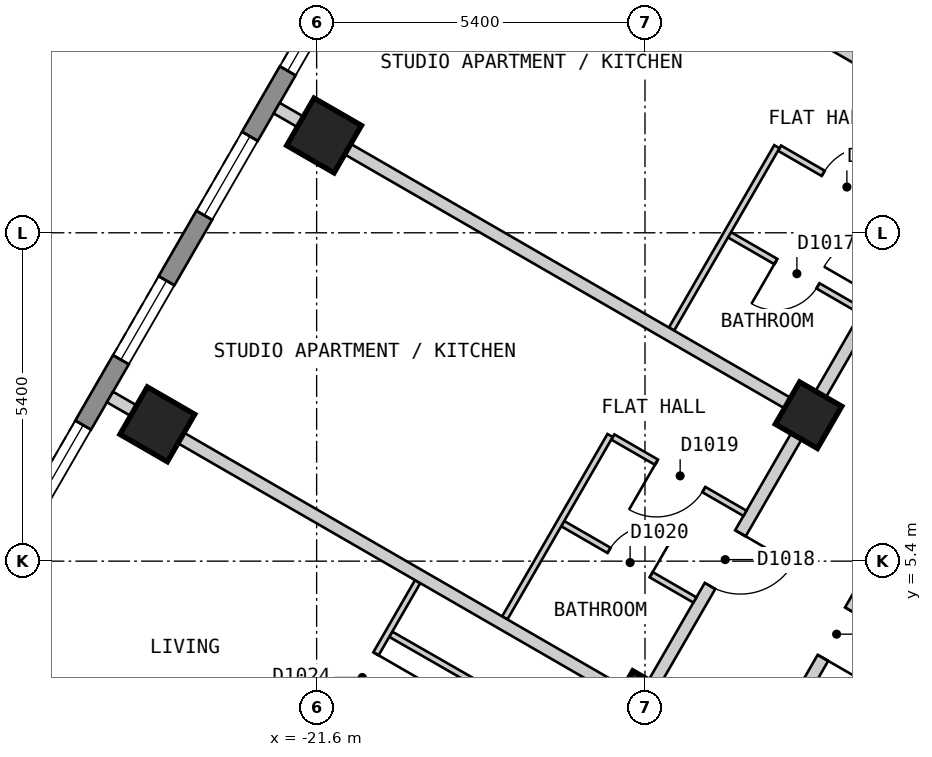
"""IFC4 building model, lengths in metres.
Left out: names, types, materials, properties, quantities, classifications, styles, units other than length and angle.
Written with IfcOpenShell. Run it as: python <this file> out.ifc"""

import sys

from ifc_helpers import new_model, si_unit, direction, frame, frame_2d, origin, origin_2d, place, context, subcontext, project, spatial, polyline, rectangle, outline, extrude, element, fill, save


model = new_model("IFC4")
c1 = context("Model", 3, precision=1e-05, world=origin(), true_north=direction((0.0, 1.0)))
c2 = subcontext(c1, "Body", "Model", "MODEL_VIEW")
j1 = project(units=[si_unit("LENGTHUNIT", "METRE"), si_unit("PLANEANGLEUNIT", "RADIAN")], contexts=[c1])
p1 = place(None, origin())
s1 = spatial("IfcSite", under=j1, at=p1, CompositionType="ELEMENT")
p2 = place(p1, origin())
s2 = spatial("IfcBuilding", under=s1, at=p2, CompositionType="ELEMENT")
p3 = place(p2, frame((0.0, 0.0, 126.6)))
s3 = spatial("IfcBuildingStorey", under=s2, at=p3, CompositionType="ELEMENT", Elevation=126.6)
for number, where, z_axis, x_axis in (
    (1, (-21.478, 12.4, 0.0), (0.0, 0.0, 1.0), (-0.5, -0.866, 0.0)),
    (2, (-24.22, 7.65, 0.0), (0.0, 0.0, 1.0), (-0.5, -0.866, 0.0)),
):
    element("IfcColumn", number, at=place(p3, frame(where, z_axis=z_axis, x_axis=x_axis)), inside=s3, PredefinedType="COLUMN", context=c2, shape_type="SweptSolid", body=[
        extrude(rectangle(XDim=0.9, YDim=0.9, at=origin_2d()), origin(), (0.0, 0.0, 1.0), 3.0),
    ])
for number, where, z_axis, x_axis in (
    (3, (-13.51, 7.8, 0.0), (0.0, 0.0, 1.0), (-0.5, -0.866, 0.0)),
    (4, (-16.253, 3.05, 0.0), (0.0, 0.0, 1.0), (-0.5, -0.866, 0.0)),
):
    element("IfcColumn", number, at=place(p3, frame(where, z_axis=z_axis, x_axis=x_axis)), inside=s3, PredefinedType="COLUMN", context=c2, shape_type="SweptSolid", body=[
        extrude(rectangle(XDim=0.8, YDim=0.8, at=origin_2d()), origin(), (0.0, 0.0, 1.0), 3.0),
    ])
p4 = place(p3, frame((-16.555, 23.025, 0.0), z_axis=(0.0, 0.0, 1.0), x_axis=(-0.500020536353, -0.866013546791, 0.0)))
e5 = element("IfcWall", 5, at=p4, inside=s3, PredefinedType="SOLIDWALL", context=c2, shape_type="SweptSolid", body=[
    extrude(outline(polyline([(0.0, -0.15), (23.325, -0.15), (23.245, 0.15), (0.08, 0.15), (0.0, -0.15)])), origin(), (0.0, 0.0, 1.0), 2.7),
])
p5 = place(p4, frame((1.314, 0.0, 0.15)))
e6 = element("IfcOpeningElement", 6, at=p5, cuts=e5, PredefinedType="OPENING", context=c2, shape_type="SweptSolid", body=[
    extrude(rectangle(XDim=1.5, YDim=2.1, at=frame_2d((0.75, 1.05))), frame((0.0, 0.16, 0.0), z_axis=(0.0, -1.0, 0.0), x_axis=(1.0, 0.0, 0.0)), (0.0, 0.0, 1.0), 0.32),
])
p6 = place(p4, frame((4.056, 0.0, 0.15)))
e7 = element("IfcOpeningElement", 7, at=p6, cuts=e5, PredefinedType="OPENING", context=c2, shape_type="SweptSolid", body=[
    extrude(rectangle(XDim=1.5, YDim=2.1, at=frame_2d((0.75, 1.05))), frame((0.0, 0.16, 0.0), z_axis=(0.0, -1.0, 0.0), x_axis=(1.0, 0.0, 0.0)), (0.0, 0.0, 1.0), 0.32),
])
p7 = place(p4, frame((6.799, 0.0, 0.15)))
e8 = element("IfcOpeningElement", 8, at=p7, cuts=e5, PredefinedType="OPENING", context=c2, shape_type="SweptSolid", body=[
    extrude(rectangle(XDim=1.5, YDim=2.1, at=frame_2d((0.75, 1.05))), frame((0.0, 0.16, 0.0), z_axis=(0.0, -1.0, 0.0), x_axis=(1.0, 0.0, 0.0)), (0.0, 0.0, 1.0), 0.32),
])
p8 = place(p4, frame((9.541, 0.0, 0.15)))
e9 = element("IfcOpeningElement", 9, at=p8, cuts=e5, PredefinedType="OPENING", context=c2, shape_type="SweptSolid", body=[
    extrude(rectangle(XDim=1.5, YDim=2.1, at=frame_2d((0.75, 1.05))), frame((0.0, 0.16, 0.0), z_axis=(0.0, -1.0, 0.0), x_axis=(1.0, 0.0, 0.0)), (0.0, 0.0, 1.0), 0.32),
])
p9 = place(p4, frame((12.285, 0.0, 0.15)))
e10 = element("IfcOpeningElement", 10, at=p9, cuts=e5, PredefinedType="OPENING", context=c2, shape_type="SweptSolid", body=[
    extrude(rectangle(XDim=1.5, YDim=2.1, at=frame_2d((0.75, 1.05))), frame((0.0, 0.16, 0.0), z_axis=(0.0, -1.0, 0.0), x_axis=(1.0, 0.0, 0.0)), (0.0, 0.0, 1.0), 0.32),
])
p10 = place(p4, frame((15.027, 0.0, 0.15)))
e11 = element("IfcOpeningElement", 11, at=p10, cuts=e5, PredefinedType="OPENING", context=c2, shape_type="SweptSolid", body=[
    extrude(rectangle(XDim=1.5, YDim=2.1, at=frame_2d((0.75, 1.05))), frame((0.0, 0.16, 0.0), z_axis=(0.0, -1.0, 0.0), x_axis=(1.0, 0.0, 0.0)), (0.0, 0.0, 1.0), 0.32),
])
p11 = place(p4, frame((17.769, 0.0, 0.15)))
e12 = element("IfcOpeningElement", 12, at=p11, cuts=e5, PredefinedType="OPENING", context=c2, shape_type="SweptSolid", body=[
    extrude(rectangle(XDim=1.5, YDim=2.1, at=frame_2d((0.75, 1.05))), frame((0.0, 0.16, 0.0), z_axis=(0.0, -1.0, 0.0), x_axis=(1.0, 0.0, 0.0)), (0.0, 0.0, 1.0), 0.32),
])
p12 = place(p4, frame((20.512, 0.0, 0.15)))
e13 = element("IfcOpeningElement", 13, at=p12, cuts=e5, PredefinedType="OPENING", context=c2, shape_type="SweptSolid", body=[
    extrude(rectangle(XDim=1.5, YDim=2.1, at=frame_2d((0.75, 1.05))), frame((0.0, 0.16, 0.0), z_axis=(0.0, -1.0, 0.0), x_axis=(1.0, 0.0, 0.0)), (0.0, 0.0, 1.0), 0.32),
])
p13 = place(p3, frame((-15.242, 0.399, 0.0), z_axis=(0.0, 0.0, 1.0), x_axis=(0.499953615651, 0.866052182145, 0.0)))
e14 = element("IfcWall", 14, at=p13, inside=s3, PredefinedType="PARTITIONING", context=c2, shape_type="SweptSolid", body=[
    extrude(rectangle(XDim=8.777, YDim=0.2, at=frame_2d((4.388, 0.0))), origin(), (0.0, 0.0, 1.0), 2.7),
])
p14 = place(p13, frame((3.938, 0.0, 0.0)))
e15 = element("IfcOpeningElement", 15, at=p14, cuts=e14, PredefinedType="OPENING", context=c2, shape_type="SweptSolid", body=[
    extrude(rectangle(XDim=0.9, YDim=2.1, at=frame_2d((0.45, 1.05))), frame((0.0, 0.11, 0.0), z_axis=(0.0, -1.0, 0.0), x_axis=(1.0, 0.0, 0.0)), (0.0, 0.0, 1.0), 0.22),
])
p15 = place(p3, frame((-17.753, 0.45, 0.0), z_axis=(0.0, 0.0, 1.0), x_axis=(0.499990970252, 0.866030617049, 0.0)))
e16 = element("IfcWall", 16, at=p15, inside=s3, PredefinedType="PARTITIONING", context=c2, shape_type="SweptSolid", body=[
    extrude(rectangle(XDim=16.974, YDim=0.2, at=frame_2d((8.487, 0.0))), origin(), (0.0, 0.0, 1.0), 2.7),
])
p16 = place(p15, frame((10.73, 0.0, 0.0)))
e17 = element("IfcOpeningElement", 17, at=p16, cuts=e16, PredefinedType="OPENING", context=c2, shape_type="SweptSolid", body=[
    extrude(rectangle(XDim=1.0, YDim=2.1, at=frame_2d((0.5, 1.05))), frame((0.0, 0.11, 0.0), z_axis=(0.0, -1.0, 0.0), x_axis=(1.0, 0.0, 0.0)), (0.0, 0.0, 1.0), 0.22),
])
p17 = place(p15, frame((5.245, 0.0, 0.0)))
e18 = element("IfcOpeningElement", 18, at=p17, cuts=e16, PredefinedType="OPENING", context=c2, shape_type="SweptSolid", body=[
    extrude(rectangle(XDim=1.0, YDim=2.1, at=frame_2d((0.5, 1.05))), frame((0.0, 0.11, 0.0), z_axis=(0.0, -1.0, 0.0), x_axis=(1.0, 0.0, 0.0)), (0.0, 0.0, 1.0), 0.22),
])
p18 = place(p15, frame((0.594, 0.0, 0.0)))
e19 = element("IfcOpeningElement", 19, at=p18, cuts=e16, PredefinedType="OPENING", context=c2, shape_type="SweptSolid", body=[
    extrude(rectangle(XDim=1.0, YDim=2.1, at=frame_2d((0.5, 1.05))), frame((0.0, 0.11, 0.0), z_axis=(0.0, -1.0, 0.0), x_axis=(1.0, 0.0, 0.0)), (0.0, 0.0, 1.0), 0.22),
])
p19 = place(p3, frame((-17.553, 6.017, 0.0), z_axis=(0.0, 0.0, 1.0), x_axis=(0.866038211682, -0.499977815414, 0.0)))
e20 = element("IfcWall", 20, at=p19, inside=s3, PredefinedType="PARTITIONING", context=c2, shape_type="SweptSolid", body=[
    extrude(rectangle(XDim=2.51, YDim=0.1, at=frame_2d((1.255, 0.0))), origin(), (0.0, 0.0, 1.0), 2.7),
])
p20 = place(p19, frame((0.88, 0.0, 0.0)))
e21 = element("IfcOpeningElement", 21, at=p20, cuts=e20, PredefinedType="OPENING", context=c2, shape_type="SweptSolid", body=[
    extrude(rectangle(XDim=0.8, YDim=2.1, at=frame_2d((0.4, 1.05))), frame((0.0, 0.06, 0.0), z_axis=(0.0, -1.0, 0.0), x_axis=(1.0, 0.0, 0.0)), (0.0, 0.0, 1.0), 0.12),
])
p21 = place(p3, frame((-20.381, 4.198, 0.0), z_axis=(0.0, 0.0, 1.0), x_axis=(0.867459321792, -0.497508115549, 0.0)))
e22 = element("IfcWall", 22, at=p21, inside=s3, PredefinedType="PARTITIONING", context=c2, shape_type="SweptSolid", body=[
    extrude(rectangle(XDim=4.05, YDim=0.1, at=frame_2d((2.025, 0.0))), origin(), (0.0, 0.0, 1.0), 2.7),
])
p22 = place(p21, frame((1.6, 0.0, 0.0)))
e23 = element("IfcOpeningElement", 23, at=p22, cuts=e22, PredefinedType="OPENING", context=c2, shape_type="SweptSolid", body=[
    extrude(rectangle(XDim=0.9, YDim=2.1, at=frame_2d((0.45, 1.05))), frame((0.0, 0.06, 0.0), z_axis=(0.0, -1.0, 0.0), x_axis=(1.0, 0.0, 0.0)), (0.0, 0.0, 1.0), 0.12),
])
p23 = place(p3, frame((-16.729, 7.442, 0.0), z_axis=(0.0, 0.0, 1.0), x_axis=(0.865983051302, -0.500073349477, 0.0)))
e24 = element("IfcWall", 24, at=p23, inside=s3, PredefinedType="PARTITIONING", context=c2, shape_type="SweptSolid", body=[
    extrude(rectangle(XDim=2.509, YDim=0.1, at=frame_2d((1.255, 0.0))), origin(), (0.0, 0.0, 1.0), 2.7),
])
p24 = place(p23, frame((0.829, 0.0, 0.0)))
e25 = element("IfcOpeningElement", 25, at=p24, cuts=e24, PredefinedType="OPENING", context=c2, shape_type="SweptSolid", body=[
    extrude(rectangle(XDim=0.9, YDim=2.1, at=frame_2d((0.45, 1.05))), frame((0.0, 0.06, 0.0), z_axis=(0.0, -1.0, 0.0), x_axis=(1.0, 0.0, 0.0)), (0.0, 0.0, 1.0), 0.12),
])
p25 = place(p3, frame((-13.987, 12.192, 0.0), z_axis=(0.0, 0.0, 1.0), x_axis=(0.865983051302, -0.500073349477, 0.0)))
e26 = element("IfcWall", 26, at=p25, inside=s3, PredefinedType="PARTITIONING", context=c2, shape_type="SweptSolid", body=[
    extrude(rectangle(XDim=2.509, YDim=0.1, at=frame_2d((1.255, 0.0))), origin(), (0.0, 0.0, 1.0), 2.7),
])
p26 = place(p25, frame((0.829, 0.0, 0.0)))
e27 = element("IfcOpeningElement", 27, at=p26, cuts=e26, PredefinedType="OPENING", context=c2, shape_type="SweptSolid", body=[
    extrude(rectangle(XDim=0.9, YDim=2.1, at=frame_2d((0.45, 1.05))), frame((0.0, 0.06, 0.0), z_axis=(0.0, -1.0, 0.0), x_axis=(1.0, 0.0, 0.0)), (0.0, 0.0, 1.0), 0.12),
])
p27 = place(p3, frame((-14.81, 10.767, 0.0), z_axis=(0.0, 0.0, 1.0), x_axis=(0.866038211682, -0.499977815414, 0.0)))
e28 = element("IfcWall", 28, at=p27, inside=s3, PredefinedType="PARTITIONING", context=c2, shape_type="SweptSolid", body=[
    extrude(rectangle(XDim=2.51, YDim=0.1, at=frame_2d((1.255, 0.0))), origin(), (0.0, 0.0, 1.0), 2.7),
])
p28 = place(p27, frame((0.88, 0.0, 0.0)))
e29 = element("IfcOpeningElement", 29, at=p28, cuts=e28, PredefinedType="OPENING", context=c2, shape_type="SweptSolid", body=[
    extrude(rectangle(XDim=0.8, YDim=2.1, at=frame_2d((0.4, 1.05))), frame((0.0, 0.06, 0.0), z_axis=(0.0, -1.0, 0.0), x_axis=(1.0, 0.0, 0.0)), (0.0, 0.0, 1.0), 0.12),
])
p29 = place(p3, frame((-18.506, 4.466, 0.0), z_axis=(0.0, 0.0, 1.0), x_axis=(0.500027479704, 0.866009537788, 0.0)))
e30 = element("IfcWall", 30, at=p29, inside=s3, PredefinedType="PARTITIONING", context=c2, shape_type="SweptSolid", body=[
    extrude(rectangle(XDim=3.464, YDim=0.1, at=frame_2d((1.732, 0.0))), origin(), (0.0, 0.0, 1.0), 2.7),
])
p30 = place(p3, frame((-15.763, 9.217, 0.0), z_axis=(0.0, 0.0, 1.0), x_axis=(0.500096714907, 0.865969558206, 0.0)))
e31 = element("IfcWall", 31, at=p30, inside=s3, PredefinedType="PARTITIONING", context=c2, shape_type="SweptSolid", body=[
    extrude(rectangle(XDim=3.463, YDim=0.1, at=frame_2d((1.731, 0.0))), origin(), (0.0, 0.0, 1.0), 2.7),
])
p31 = place(p3, frame((-22.603, 0.449, 0.0), z_axis=(0.0, 0.0, 1.0), x_axis=(0.500022588228, 0.866012362072, 0.0)))
e32 = element("IfcWall", 32, at=p31, inside=s3, PredefinedType="PARTITIONING", context=c2, shape_type="SweptSolid", body=[
    extrude(rectangle(XDim=5.328, YDim=0.1, at=frame_2d((2.664, 0.0))), origin(), (0.0, 0.0, 1.0), 2.7),
])
p32 = place(p31, frame((3.058, 0.0, 0.0)))
e33 = element("IfcOpeningElement", 33, at=p32, cuts=e32, PredefinedType="OPENING", context=c2, shape_type="SweptSolid", body=[
    extrude(rectangle(XDim=0.9, YDim=2.1, at=frame_2d((0.45, 1.05))), frame((0.0, 0.06, 0.0), z_axis=(0.0, -1.0, 0.0), x_axis=(1.0, 0.0, 0.0)), (0.0, 0.0, 1.0), 0.12),
])
p33 = place(p3, frame((-24.999, 8.1, 0.0), z_axis=(0.0, 0.0, 1.0), x_axis=(0.866016855193, -0.500014806302, 0.0)))
e34 = element("IfcWall", 34, at=p33, inside=s3, PredefinedType="PARTITIONING", context=c2, shape_type="SweptSolid", body=[
    extrude(rectangle(XDim=10.0, YDim=0.2, at=frame_2d((5.0, 0.0))), origin(), (0.0, 0.0, 1.0), 2.7),
])
p34 = place(p3, frame((-22.257, 12.85, 0.0), z_axis=(0.0, 0.0, 1.0), x_axis=(0.866047370643, -0.499961950354, 0.0)))
e35 = element("IfcWall", 35, at=p34, inside=s3, PredefinedType="PARTITIONING", context=c2, shape_type="SweptSolid", body=[
    extrude(rectangle(XDim=10.001, YDim=0.2, at=frame_2d((5.0, 0.0))), origin(), (0.0, 0.0, 1.0), 2.7),
])
p35 = place(p3, frame((-19.514, 17.599, 0.0), z_axis=(0.0, 0.0, 1.0), x_axis=(0.866059142644, -0.499941558027, 0.0)))
e36 = element("IfcWall", 36, at=p35, inside=s3, PredefinedType="PARTITIONING", context=c2, shape_type="SweptSolid", body=[
    extrude(rectangle(XDim=9.999, YDim=0.2, at=frame_2d((5.0, 0.0))), origin(), (0.0, 0.0, 1.0), 2.7),
])
p36 = place(p8, origin())
e37 = element("IfcWindow", 37, at=p36, inside=s3, PartitioningType="SINGLE_PANEL", PredefinedType="WINDOW", context=c2, shape_type="SweptSolid", body=[
    extrude(rectangle(XDim=1.5, YDim=2.1, at=frame_2d((0.75, 1.05))), frame((0.0, 0.03, 0.0), z_axis=(0.0, -1.0, 0.0), x_axis=(1.0, 0.0, 0.0)), (0.0, 0.0, 1.0), 0.06),
])
fill(e9, e37)
p37 = place(p9, origin())
e38 = element("IfcWindow", 38, at=p37, inside=s3, PartitioningType="SINGLE_PANEL", PredefinedType="WINDOW", context=c2, shape_type="SweptSolid", body=[
    extrude(rectangle(XDim=1.5, YDim=2.1, at=frame_2d((0.75, 1.05))), frame((0.0, 0.03, 0.0), z_axis=(0.0, -1.0, 0.0), x_axis=(1.0, 0.0, 0.0)), (0.0, 0.0, 1.0), 0.06),
])
fill(e10, e38)
p38 = place(p10, origin())
e39 = element("IfcWindow", 39, at=p38, inside=s3, PartitioningType="SINGLE_PANEL", PredefinedType="WINDOW", context=c2, shape_type="SweptSolid", body=[
    extrude(rectangle(XDim=1.5, YDim=2.1, at=frame_2d((0.75, 1.05))), frame((0.0, 0.03, 0.0), z_axis=(0.0, -1.0, 0.0), x_axis=(1.0, 0.0, 0.0)), (0.0, 0.0, 1.0), 0.06),
])
fill(e11, e39)
p39 = place(p11, origin())
e40 = element("IfcWindow", 40, at=p39, inside=s3, PartitioningType="SINGLE_PANEL", PredefinedType="WINDOW", context=c2, shape_type="SweptSolid", body=[
    extrude(rectangle(XDim=1.5, YDim=2.1, at=frame_2d((0.75, 1.05))), frame((0.0, 0.03, 0.0), z_axis=(0.0, -1.0, 0.0), x_axis=(1.0, 0.0, 0.0)), (0.0, 0.0, 1.0), 0.06),
])
fill(e12, e40)
p40 = place(p26, origin())
e41 = element("IfcDoor", 41, at=p40, inside=s3, OperationType="SINGLE_SWING_RIGHT", PredefinedType="DOOR", context=c2, shape_type="SweptSolid", body=[
    extrude(rectangle(XDim=0.9, YDim=2.1, at=frame_2d((0.45, 1.05))), frame((0.0, 0.025, 0.0), z_axis=(0.0, -1.0, 0.0), x_axis=(1.0, 0.0, 0.0)), (0.0, 0.0, 1.0), 0.05),
])
fill(e27, e41)
p41 = place(p28, origin())
e42 = element("IfcDoor", 42, at=p41, inside=s3, OperationType="SINGLE_SWING_LEFT", PredefinedType="DOOR", context=c2, shape_type="SweptSolid", body=[
    extrude(rectangle(XDim=0.8, YDim=2.1, at=frame_2d((0.4, 1.05))), frame((0.0, 0.025, 0.0), z_axis=(0.0, -1.0, 0.0), x_axis=(1.0, 0.0, 0.0)), (0.0, 0.0, 1.0), 0.05),
])
fill(e29, e42)
p42 = place(p17, origin())
e43 = element("IfcDoor", 43, at=p42, inside=s3, OperationType="SINGLE_SWING_RIGHT", PredefinedType="DOOR", context=c2, shape_type="SweptSolid", body=[
    extrude(rectangle(XDim=1.0, YDim=2.1, at=frame_2d((0.5, 1.05))), frame((0.0, 0.025, 0.0), z_axis=(0.0, -1.0, 0.0), x_axis=(1.0, 0.0, 0.0)), (0.0, 0.0, 1.0), 0.05),
])
fill(e18, e43)
p43 = place(p24, origin())
e44 = element("IfcDoor", 44, at=p43, inside=s3, OperationType="SINGLE_SWING_LEFT", PredefinedType="DOOR", context=c2, shape_type="SweptSolid", body=[
    extrude(rectangle(XDim=0.9, YDim=2.1, at=frame_2d((0.45, 1.05))), frame((0.0, 0.025, 0.0), z_axis=(0.0, -1.0, 0.0), x_axis=(1.0, 0.0, 0.0)), (0.0, 0.0, 1.0), 0.05),
])
fill(e25, e44)
p44 = place(p20, origin())
e45 = element("IfcDoor", 45, at=p44, inside=s3, OperationType="SINGLE_SWING_RIGHT", PredefinedType="DOOR", context=c2, shape_type="SweptSolid", body=[
    extrude(rectangle(XDim=0.8, YDim=2.1, at=frame_2d((0.4, 1.05))), frame((0.0, 0.025, 0.0), z_axis=(0.0, -1.0, 0.0), x_axis=(1.0, 0.0, 0.0)), (0.0, 0.0, 1.0), 0.05),
])
fill(e21, e45)
p45 = place(p32, origin())
e46 = element("IfcDoor", 46, at=p45, inside=s3, OperationType="SINGLE_SWING_RIGHT", PredefinedType="DOOR", context=c2, shape_type="SweptSolid", body=[
    extrude(rectangle(XDim=0.9, YDim=2.1, at=frame_2d((0.45, 1.05))), frame((0.0, 0.025, 0.0), z_axis=(0.0, -1.0, 0.0), x_axis=(1.0, 0.0, 0.0)), (0.0, 0.0, 1.0), 0.05),
])
fill(e33, e46)
p46 = place(p14, origin())
e47 = element("IfcDoor", 47, at=p46, inside=s3, OperationType="SINGLE_SWING_LEFT", PredefinedType="DOOR", context=c2, shape_type="SweptSolid", body=[
    extrude(rectangle(XDim=0.9, YDim=2.1, at=frame_2d((0.45, 1.05))), frame((0.0, 0.025, 0.0), z_axis=(0.0, -1.0, 0.0), x_axis=(1.0, 0.0, 0.0)), (0.0, 0.0, 1.0), 0.05),
])
fill(e15, e47)
save(model, sys.argv[1])
